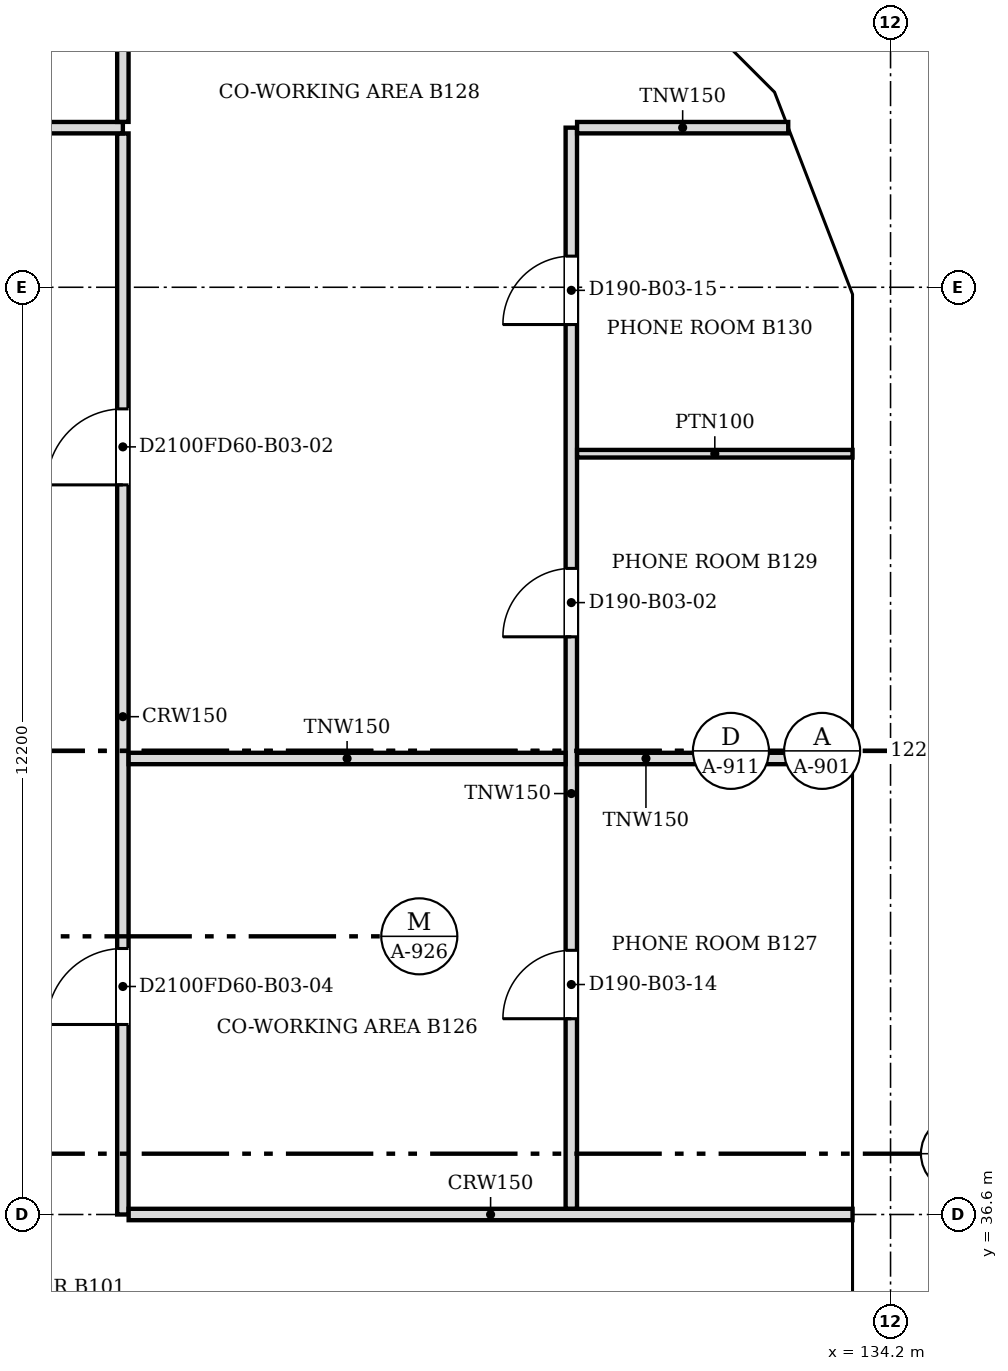
"""IFC4 building model, lengths in metres.
Left out: names, types, materials, properties, quantities, classifications, styles, units other than length and angle.
Written with IfcOpenShell. Run it as: python <this file> out.ifc"""

import sys

from ifc_helpers import new_model, si_unit, direction, frame, frame_2d, origin, place, context, subcontext, project, spatial, polyline, rectangle, outline, extrude, faceted_brep, source, transform, mapped, element, fill, save


model = new_model("IFC4")
c1 = context("Model", 3, precision=1e-05, world=origin(), true_north=direction((0.0, 1.0)))
c2 = subcontext(c1, "Body", "Model", "MODEL_VIEW")
j1 = project(units=[si_unit("LENGTHUNIT", "METRE"), si_unit("PLANEANGLEUNIT", "RADIAN")], contexts=[c1])
p1 = place(None, origin())
s1 = spatial("IfcSite", under=j1, at=p1, CompositionType="ELEMENT")
p2 = place(p1, origin())
s2 = spatial("IfcBuilding", under=s1, at=p2, CompositionType="ELEMENT")
p3 = place(p2, frame((0.0, 0.0, 25.8)))
s3 = spatial("IfcBuildingStorey", under=s2, at=p3, CompositionType="ELEMENT", Elevation=25.8)
m1 = source(origin(), c2, "Body", "SweptSolid", [
    extrude(outline(polyline([(6.1, 0.0), (3.05, 3.8), (0.0, 0.0), (6.1, 0.0)])), frame((0.0, 0.25, 0.0), z_axis=(0.0, -1.0, 0.0), x_axis=(1.0, 0.0, 0.0)), (0.0, 0.0, 1.0), 0.5),
])
p4 = place(p3, frame((133.95, 30.5, 0.0), z_axis=(0.0, 0.0, 1.0), x_axis=(0.0, 1.0, 0.0)))
e1 = element("IfcWall", 1, at=p4, inside=s3, PredefinedType="SOLIDWALL", context=c2, shape_type="MappedRepresentation", body=[
    mapped(m1, transform((0.0, 0.0, 0.0), scale=1.0)),
])
m2 = source(origin(), c2, "Body", "SweptSolid", [
    extrude(outline(polyline([(5.579, 0.25), (3.05, 3.401), (0.521, 0.25), (5.579, 0.25)])), frame((0.0, 0.26, 0.0), z_axis=(0.0, -1.0, 0.0), x_axis=(1.0, 0.0, 0.0)), (0.0, 0.0, 1.0), 0.52),
])
p5 = place(p4, origin())
e2 = element("IfcOpeningElement", 2, at=p5, cuts=e1, PredefinedType="OPENING", context=c2, shape_type="MappedRepresentation", body=[
    mapped(m2, transform((0.0, 0.0, 0.0), scale=1.0)),
])
m3 = source(origin(), c2, "Body", "Brep", [
    faceted_brep([(6.1, -0.25, 0.0), (3.05, -0.25, 3.8), (0.0, -0.25, 0.0), (6.1, -0.25, 0.0), (0.0, 0.25, 0.0), (3.05, 0.25, 3.8), (6.1, 0.25, 0.0), (6.1, 0.25, 0.0)], [[[0, 1, 2, 3]], [[4, 5, 6, 7]], [[6, 5, 1, 0]], [[5, 4, 2, 1]], [[4, 7, 3, 2]], [[3, 7, 6, 0]]]),
])
p6 = place(p3, frame((133.95, 36.6, 0.0), z_axis=(0.0, 0.0, 1.0), x_axis=(0.0, 1.0, 0.0)))
e3 = element("IfcWall", 3, at=p6, inside=s3, PredefinedType="SOLIDWALL", context=c2, shape_type="MappedRepresentation", body=[
    mapped(m3, transform((0.0, 0.0, 0.0), scale=1.0)),
])
p7 = place(p6, origin())
e4 = element("IfcOpeningElement", 4, at=p7, cuts=e3, PredefinedType="OPENING", context=c2, shape_type="MappedRepresentation", body=[
    mapped(m2, transform((0.0, 0.0, 0.0), scale=1.0)),
])
m4 = source(origin(), c2, "Body", "Brep", [
    faceted_brep([(6.053, -0.25, 0.0), (3.05, -0.25, 3.8), (0.0, -0.25, 0.0), (0.0, 0.25, 0.0), (3.05, 0.25, 3.8), (6.007, 0.25, 0.059), (6.007, 0.25, 0.0), (6.053, 0.0, 0.0)], [[[0, 1, 2]], [[3, 4, 5, 6]], [[5, 4, 1, 0, 7]], [[4, 3, 2, 1]], [[3, 6, 7, 0, 2]], [[7, 6, 5]]]),
])
p8 = place(p3, frame((133.95, 42.7, 0.0), z_axis=(0.0, 0.0, 1.0), x_axis=(0.0, 1.0, 0.0)))
e5 = element("IfcWall", 5, at=p8, inside=s3, PredefinedType="SOLIDWALL", context=c2, shape_type="MappedRepresentation", body=[
    mapped(m4, transform((0.0, 0.0, 0.0), scale=1.0)),
])
m5 = source(origin(), c2, "Body", "SweptSolid", [
    extrude(outline(polyline([(5.537, 0.25), (3.049, 3.399), (0.521, 0.25), (5.537, 0.25)])), frame((0.0, 0.26, 0.0), z_axis=(0.0, -1.0, 0.0), x_axis=(1.0, 0.0, 0.0)), (0.0, 0.0, 1.0), 0.52),
])
p9 = place(p8, origin())
e6 = element("IfcOpeningElement", 6, at=p9, cuts=e5, PredefinedType="OPENING", context=c2, shape_type="MappedRepresentation", body=[
    mapped(m5, transform((0.0, 0.0, 0.0), scale=1.0)),
])
m6 = source(origin(), c2, "Body", "Brep", [
    faceted_brep([(3.003, -0.25, 3.732), (2.95, -0.25, 3.8), (0.0, -0.25, 0.0), (3.003, -0.25, 0.0), (0.047, 0.25, 0.06), (2.898, 0.25, 3.732), (2.898, 0.25, 0.0), (0.047, 0.25, 0.0), (2.95, 0.0, 3.8), (0.0, 0.0, 0.0)], [[[0, 1, 2, 3]], [[4, 5, 6, 7]], [[8, 1, 0]], [[5, 4, 9, 2, 1, 8]], [[7, 6, 3, 2, 9]], [[7, 9, 4]], [[3, 6, 5, 8, 0]]]),
])
p10 = place(p3, frame((133.95, 48.753, 0.0), z_axis=(0.0, 0.0, 1.0), x_axis=(-0.359855894603, 0.933007896601, 0.0)))
e7 = element("IfcWall", 7, at=p10, inside=s3, PredefinedType="SOLIDWALL", context=c2, shape_type="MappedRepresentation", body=[
    mapped(m6, transform((0.0, 0.0, 0.0), scale=1.0)),
])
m7 = source(origin(), c2, "Body", "SweptSolid", [
    extrude(outline(polyline([(2.75, 3.135), (0.511, 0.25), (2.75, 0.25), (2.75, 3.135)])), frame((0.0, 0.26, 0.0), z_axis=(0.0, -1.0, 0.0), x_axis=(1.0, 0.0, 0.0)), (0.0, 0.0, 1.0), 0.52),
])
p11 = place(p10, origin())
e8 = element("IfcOpeningElement", 8, at=p11, cuts=e7, PredefinedType="OPENING", context=c2, shape_type="MappedRepresentation", body=[
    mapped(m7, transform((0.0, 0.0, 0.0), scale=1.0)),
])
m8 = source(origin(), c2, "Body", "Brep", [
    faceted_brep([(2.997, -0.25, 0.0), (0.053, -0.25, 3.8), (0.0, -0.25, 3.732), (0.0, -0.25, 0.0), (0.106, 0.25, 3.732), (2.944, 0.25, 0.068), (2.944, 0.25, 0.0), (0.106, 0.25, 0.0), (0.053, 0.0, 3.8), (2.997, 0.0, 0.0)], [[[0, 1, 2, 3]], [[4, 5, 6, 7]], [[5, 4, 8, 1, 0, 9]], [[2, 1, 8]], [[7, 6, 9, 0, 3]], [[7, 3, 2, 8, 4]], [[9, 6, 5]]]),
])
p12 = place(p3, frame((132.926, 51.469, 0.0), z_axis=(0.0, 0.0, 1.0), x_axis=(-0.707066050402, 0.707147509625, 0.0)))
e9 = element("IfcWall", 9, at=p12, inside=s3, PredefinedType="SOLIDWALL", context=c2, shape_type="MappedRepresentation", body=[
    mapped(m8, transform((0.0, 0.0, 0.0), scale=1.0)),
])
m9 = source(origin(), c2, "Body", "SweptSolid", [
    extrude(outline(polyline([(2.487, 0.25), (0.253, 3.134), (0.253, 0.25), (2.487, 0.25)])), frame((0.0, 0.26, 0.0), z_axis=(0.0, -1.0, 0.0), x_axis=(1.0, 0.0, 0.0)), (0.0, 0.0, 1.0), 0.52),
])
p13 = place(p12, origin())
e10 = element("IfcOpeningElement", 10, at=p13, cuts=e9, PredefinedType="OPENING", context=c2, shape_type="MappedRepresentation", body=[
    mapped(m9, transform((0.0, 0.0, 0.0), scale=1.0)),
])
p14 = place(p2, frame((0.0, 0.0, 29.6)))
s4 = spatial("IfcBuildingStorey", under=s2, at=p14, CompositionType="ELEMENT", Elevation=29.6)
m10 = source(origin(), c2, "Body", "Brep", [
    faceted_brep([(3.05, -0.25, 0.0), (6.1, -0.25, 3.8), (6.1, -0.25, 3.8), (3.05, -0.25, 7.6), (0.0, -0.25, 3.8), (0.0, 0.25, 3.8), (3.05, 0.25, 7.6), (6.1, 0.25, 3.8), (6.1, 0.25, 3.8), (3.05, 0.25, 0.0)], [[[0, 1, 2, 3, 4]], [[5, 6, 7, 8, 9]], [[9, 8, 1, 0]], [[7, 6, 3, 2]], [[6, 5, 4, 3]], [[5, 9, 0, 4]], [[1, 8, 7, 2]]]),
])
p15 = place(p14, frame((133.95, 33.55, -3.8), z_axis=(0.0, 0.0, 1.0), x_axis=(0.0, 1.0, 0.0)))
e11 = element("IfcWall", 11, at=p15, inside=s4, PredefinedType="SOLIDWALL", context=c2, shape_type="MappedRepresentation", body=[
    mapped(m10, transform((0.0, 0.0, 0.0), scale=1.0)),
])
m11 = source(origin(), c2, "Body", "SweptSolid", [
    extrude(outline(polyline([(3.05, 0.399), (5.78, 3.8), (3.05, 7.2), (0.321, 3.8), (3.05, 0.399)])), frame((0.0, 0.26, 0.0), z_axis=(0.0, -1.0, 0.0), x_axis=(1.0, 0.0, 0.0)), (0.0, 0.0, 1.0), 0.52),
])
p16 = place(p15, origin())
e12 = element("IfcOpeningElement", 12, at=p16, cuts=e11, PredefinedType="OPENING", context=c2, shape_type="MappedRepresentation", body=[
    mapped(m11, transform((0.0, 0.0, 0.0), scale=1.0)),
])
m12 = source(origin(), c2, "Body", "SweptSolid", [
    extrude(outline(polyline([(3.05, 0.0), (6.1, 3.8), (3.05, 7.6), (0.0, 3.8), (3.05, 0.0)])), frame((0.0, 0.25, 0.0), z_axis=(0.0, -1.0, 0.0), x_axis=(1.0, 0.0, 0.0)), (0.0, 0.0, 1.0), 0.5),
])
p17 = place(p14, frame((133.95, 39.65, -3.8), z_axis=(0.0, 0.0, 1.0), x_axis=(0.0, 1.0, 0.0)))
e13 = element("IfcWall", 13, at=p17, inside=s4, PredefinedType="SOLIDWALL", context=c2, shape_type="MappedRepresentation", body=[
    mapped(m12, transform((0.0, 0.0, 0.0), scale=1.0)),
])
p18 = place(p17, origin())
e14 = element("IfcOpeningElement", 14, at=p18, cuts=e13, PredefinedType="OPENING", context=c2, shape_type="MappedRepresentation", body=[
    mapped(m11, transform((0.0, 0.0, 0.0), scale=1.0)),
])
m13 = source(origin(), c2, "Body", "Brep", [
    faceted_brep([(3.003, -0.25, 0.0), (3.05, -0.25, 0.06), (3.05, -0.25, 7.54), (3.003, -0.25, 7.6), (0.0, -0.25, 3.8), (0.0, 0.25, 3.8), (2.957, 0.25, 7.541), (2.957, 0.25, 0.059), (3.003, 0.0, 0.0), (3.003, 0.0, 7.6)], [[[0, 1, 2, 3, 4]], [[5, 6, 7]], [[1, 0, 8]], [[9, 3, 2]], [[6, 5, 4, 3, 9]], [[5, 7, 8, 0, 4]], [[1, 8, 7, 6, 9, 2]]]),
])
p19 = place(p14, frame((133.95, 45.75, -3.8), z_axis=(0.0, 0.0, 1.0), x_axis=(0.0, 1.0, 0.0)))
e15 = element("IfcWall", 15, at=p19, inside=s4, PredefinedType="SOLIDWALL", context=c2, shape_type="MappedRepresentation", body=[
    mapped(m13, transform((0.0, 0.0, 0.0), scale=1.0)),
])
m14 = source(origin(), c2, "Body", "SweptSolid", [
    extrude(outline(polyline([(2.803, 6.944), (0.319, 3.8), (2.803, 0.656), (2.803, 6.944)])), frame((0.0, 0.26, 0.0), z_axis=(0.0, -1.0, 0.0), x_axis=(1.0, 0.0, 0.0)), (0.0, 0.0, 1.0), 0.52),
])
p20 = place(p19, origin())
e16 = element("IfcOpeningElement", 16, at=p20, cuts=e15, PredefinedType="OPENING", context=c2, shape_type="MappedRepresentation", body=[
    mapped(m14, transform((0.0, 0.0, 0.0), scale=1.0)),
])
m15 = source(origin(), c2, "Body", "Brep", [
    faceted_brep([(0.047, -0.25, 0.0), (2.997, -0.25, 3.8), (0.047, -0.25, 7.6), (0.0, -0.25, 7.541), (0.0, -0.25, 0.059), (0.093, 0.25, 7.54), (2.944, 0.25, 3.868), (2.944, 0.25, 3.732), (0.093, 0.25, 0.06), (2.997, 0.0, 3.8), (0.047, 0.0, 0.0), (0.047, 0.0, 7.6)], [[[0, 1, 2, 3, 4]], [[5, 6, 7, 8]], [[8, 7, 9, 1, 0, 10]], [[6, 5, 11, 2, 1, 9]], [[3, 2, 11]], [[10, 0, 4]], [[8, 10, 4, 3, 11, 5]], [[7, 6, 9]]]),
])
p21 = place(p14, frame((133.967, 48.71, -3.8), z_axis=(0.0, 0.0, 1.0), x_axis=(-0.359901446078, 0.932990326376, 0.0)))
e17 = element("IfcWall", 17, at=p21, inside=s4, PredefinedType="SOLIDWALL", context=c2, shape_type="MappedRepresentation", body=[
    mapped(m15, transform((0.0, 0.0, 0.0), scale=1.0)),
])
m16 = source(origin(), c2, "Body", "SweptSolid", [
    extrude(outline(polyline([(0.247, 0.665), (2.681, 3.8), (0.247, 6.935), (0.247, 0.665)])), frame((0.0, 0.26, 0.0), z_axis=(0.0, -1.0, 0.0), x_axis=(1.0, 0.0, 0.0)), (0.0, 0.0, 1.0), 0.52),
])
p22 = place(p21, origin())
e18 = element("IfcOpeningElement", 18, at=p22, cuts=e17, PredefinedType="OPENING", context=c2, shape_type="MappedRepresentation", body=[
    mapped(m16, transform((0.0, 0.0, 0.0), scale=1.0)),
])
m17 = source(origin(), c2, "Body", "Brep", [
    faceted_brep([(2.944, -0.25, 0.0), (2.997, -0.25, 0.068), (2.997, -0.25, 7.532), (2.944, -0.25, 7.6), (0.0, -0.25, 3.8), (0.053, 0.25, 3.868), (2.891, 0.25, 7.532), (2.891, 0.25, 0.068), (0.053, 0.25, 3.732), (2.944, 0.0, 0.0), (2.944, 0.0, 7.6), (0.0, 0.0, 3.8)], [[[0, 1, 2, 3, 4]], [[5, 6, 7, 8]], [[1, 0, 9]], [[10, 3, 2]], [[6, 5, 11, 4, 3, 10]], [[8, 7, 9, 0, 4, 11]], [[8, 11, 5]], [[1, 9, 7, 6, 10, 2]]]),
])
p23 = place(p14, frame((132.888, 51.506, -3.8), z_axis=(0.0, 0.0, 1.0), x_axis=(-0.707147509625, 0.707066050402, 0.0)))
e19 = element("IfcWall", 19, at=p23, inside=s4, PredefinedType="SOLIDWALL", context=c2, shape_type="MappedRepresentation", body=[
    mapped(m17, transform((0.0, 0.0, 0.0), scale=1.0)),
])
m18 = source(origin(), c2, "Body", "SweptSolid", [
    extrude(outline(polyline([(2.744, 6.934), (0.316, 3.8), (2.744, 0.666), (2.744, 6.934)])), frame((0.0, 0.26, 0.0), z_axis=(0.0, -1.0, 0.0), x_axis=(1.0, 0.0, 0.0)), (0.0, 0.0, 1.0), 0.52),
])
p24 = place(p23, origin())
e20 = element("IfcOpeningElement", 20, at=p24, cuts=e19, PredefinedType="OPENING", context=c2, shape_type="MappedRepresentation", body=[
    mapped(m18, transform((0.0, 0.0, 0.0), scale=1.0)),
])
p25 = place(p3, frame((124.1, 50.824, 0.0), z_axis=(0.0, 0.0, 1.0), x_axis=(0.0, -1.0, 0.0)))
e21 = element("IfcWall", 21, at=p25, inside=s3, PredefinedType="PARTITIONING", context=c2, shape_type="SweptSolid", body=[
    extrude(rectangle(XDim=14.224, YDim=0.15, at=frame_2d((7.112, 0.0))), origin(), (0.0, 0.0, 1.0), 3.067),
])
m19 = source(origin(), c2, "Body", "SweptSolid", [
    extrude(rectangle(XDim=1.0, YDim=2.1, at=frame_2d((0.5, 1.05))), frame((0.0, 0.085, 0.0), z_axis=(0.0, -1.0, 0.0), x_axis=(1.0, 0.0, 0.0)), (0.0, 0.0, 1.0), 0.17),
])
p26 = place(p25, frame((3.624, 0.0, 0.0)))
e22 = element("IfcOpeningElement", 22, at=p26, cuts=e21, PredefinedType="OPENING", context=c2, shape_type="MappedRepresentation", body=[
    mapped(m19, transform((0.0, 0.0, 0.0), scale=1.0)),
])
p27 = place(p25, frame((10.724, 0.0, 0.0)))
e23 = element("IfcOpeningElement", 23, at=p27, cuts=e21, PredefinedType="OPENING", context=c2, shape_type="MappedRepresentation", body=[
    mapped(m19, transform((0.0, 0.0, 0.0), scale=1.0)),
])
p28 = place(p3, frame((124.176, 36.6, 0.0), z_axis=(0.0, 0.0, 1.0), x_axis=(1.0, 0.0, 0.0)))
e24 = element("IfcWall", 24, at=p28, inside=s3, PredefinedType="PARTITIONING", context=c2, shape_type="SweptSolid", body=[
    extrude(rectangle(XDim=9.524, YDim=0.15, at=frame_2d((4.762, 0.0))), origin(), (0.0, 0.0, 1.0), 3.067),
])
p29 = place(p3, frame((130.0, 50.9, 0.0), z_axis=(0.0, 0.0, 1.0), x_axis=(0.0, -1.0, 0.0)))
e25 = element("IfcWall", 25, at=p29, inside=s3, PredefinedType="PARTITIONING", context=c2, shape_type="SweptSolid", body=[
    extrude(rectangle(XDim=14.224, YDim=0.15, at=frame_2d((7.112, 0.0))), origin(), (0.0, 0.0, 1.0), 3.067),
])
m20 = source(origin(), c2, "Body", "SweptSolid", [
    extrude(rectangle(XDim=0.9, YDim=2.1, at=frame_2d((0.45, 1.05))), frame((0.0, 0.085, 0.0), z_axis=(0.0, -1.0, 0.0), x_axis=(1.0, 0.0, 0.0)), (0.0, 0.0, 1.0), 0.17),
])
p30 = place(p29, frame((5.799, 0.0, 0.0)))
e26 = element("IfcOpeningElement", 26, at=p30, cuts=e25, PredefinedType="OPENING", context=c2, shape_type="MappedRepresentation", body=[
    mapped(m20, transform((0.0, 0.0, 0.0), scale=1.0)),
])
p31 = place(p29, frame((10.824, 0.0, 0.0)))
e27 = element("IfcOpeningElement", 27, at=p31, cuts=e25, PredefinedType="OPENING", context=c2, shape_type="MappedRepresentation", body=[
    mapped(m20, transform((0.0, 0.0, 0.0), scale=1.0)),
])
p32 = place(p29, frame((1.69, 0.0, 0.0)))
e28 = element("IfcOpeningElement", 28, at=p32, cuts=e25, PredefinedType="OPENING", context=c2, shape_type="MappedRepresentation", body=[
    mapped(m20, transform((0.0, 0.0, 0.0), scale=1.0)),
])
p33 = place(p3, frame((124.176, 42.6, 0.0), z_axis=(0.0, 0.0, 1.0), x_axis=(1.0, 0.0, 0.0)))
e29 = element("IfcWall", 29, at=p33, inside=s3, PredefinedType="PARTITIONING", context=c2, shape_type="SweptSolid", body=[
    extrude(rectangle(XDim=5.748, YDim=0.15, at=frame_2d((2.874, 0.0))), origin(), (0.0, 0.0, 1.0), 3.067),
])
p34 = place(p3, frame((130.076, 42.6, 0.0), z_axis=(0.0, 0.0, 1.0), x_axis=(1.0, 0.0, 0.0)))
e30 = element("IfcWall", 30, at=p34, inside=s3, PredefinedType="PARTITIONING", context=c2, shape_type="SweptSolid", body=[
    extrude(rectangle(XDim=3.624, YDim=0.15, at=frame_2d((1.812, 0.0))), origin(), (0.0, 0.0, 1.0), 3.067),
])
p35 = place(p3, frame((130.076, 46.61, 0.0), z_axis=(0.0, 0.0, 1.0), x_axis=(1.0, 0.0, 0.0)))
e31 = element("IfcWall", 31, at=p35, inside=s3, PredefinedType="PARTITIONING", context=c2, shape_type="SweptSolid", body=[
    extrude(rectangle(XDim=3.624, YDim=0.1, at=frame_2d((1.812, 0.0))), origin(), (0.0, 0.0, 1.0), 3.067),
])
p36 = place(p3, frame((108.5, 50.9, 0.0), z_axis=(0.0, 0.0, 1.0), x_axis=(1.0, 0.0, 0.0)))
e32 = element("IfcWall", 32, at=p36, inside=s3, PredefinedType="PARTITIONING", context=c2, shape_type="SweptSolid", body=[
    extrude(rectangle(XDim=15.6, YDim=0.15, at=frame_2d((7.8, 0.0))), origin(), (0.0, 0.0, 1.0), 3.067),
])
p37 = place(p36, frame((7.3, 0.0, 0.0)))
e33 = element("IfcOpeningElement", 33, at=p37, cuts=e32, PredefinedType="OPENING", context=c2, shape_type="MappedRepresentation", body=[
    mapped(m19, transform((0.0, 0.0, 0.0), scale=1.0)),
])
p38 = place(p3, frame((130.076, 50.9, 0.0), z_axis=(0.0, 0.0, 1.0), x_axis=(1.0, 0.0, 0.0)))
e34 = element("IfcWall", 34, at=p38, inside=s3, PredefinedType="PARTITIONING", context=c2, shape_type="SweptSolid", body=[
    extrude(rectangle(XDim=2.778, YDim=0.15, at=frame_2d((1.389, 0.0))), origin(), (0.0, 0.0, 1.0), 3.067),
])
p39 = place(p3, frame((124.1, 50.976, 0.0), z_axis=(0.0, 0.0, 1.0), x_axis=(0.0, 1.0, 0.0)))
e35 = element("IfcWall", 35, at=p39, inside=s3, PredefinedType="PARTITIONING", context=c2, shape_type="SweptSolid", body=[
    extrude(rectangle(XDim=3.424, YDim=0.15, at=frame_2d((1.712, 0.0))), origin(), (0.0, 0.0, 1.0), 3.067),
])
m21 = source(origin(), c2, "Body", "SweptSolid", [
    extrude(rectangle(XDim=0.9, YDim=2.1, at=frame_2d((0.45, 1.05))), frame((0.0, 0.025, 0.0), z_axis=(0.0, -1.0, 0.0), x_axis=(1.0, 0.0, 0.0)), (0.0, 0.0, 1.0), 0.05),
])
p40 = place(p30, origin())
e36 = element("IfcDoor", 36, at=p40, inside=s3, OperationType="SINGLE_SWING_RIGHT", PredefinedType="DOOR", context=c2, shape_type="MappedRepresentation", body=[
    mapped(m21, transform((0.0, 0.0, 0.0), scale=1.0)),
])
fill(e26, e36)
p41 = place(p31, origin())
e37 = element("IfcDoor", 37, at=p41, inside=s3, OperationType="SINGLE_SWING_RIGHT", PredefinedType="DOOR", context=c2, shape_type="MappedRepresentation", body=[
    mapped(m21, transform((0.0, 0.0, 0.0), scale=1.0)),
])
fill(e27, e37)
p42 = place(p32, origin())
e38 = element("IfcDoor", 38, at=p42, inside=s3, OperationType="SINGLE_SWING_RIGHT", PredefinedType="DOOR", context=c2, shape_type="MappedRepresentation", body=[
    mapped(m21, transform((0.0, 0.0, 0.0), scale=1.0)),
])
fill(e28, e38)
m22 = source(origin(), c2, "Body", "SweptSolid", [
    extrude(rectangle(XDim=1.0, YDim=2.1, at=frame_2d((0.5, 1.05))), frame((0.0, 0.025, 0.0), z_axis=(0.0, -1.0, 0.0), x_axis=(1.0, 0.0, 0.0)), (0.0, 0.0, 1.0), 0.05),
])
p43 = place(p26, origin())
e39 = element("IfcDoor", 39, at=p43, inside=s3, OperationType="SINGLE_SWING_RIGHT", PredefinedType="DOOR", context=c2, shape_type="MappedRepresentation", body=[
    mapped(m22, transform((0.0, 0.0, 0.0), scale=1.0)),
])
fill(e22, e39)
p44 = place(p27, origin())
e40 = element("IfcDoor", 40, at=p44, inside=s3, OperationType="SINGLE_SWING_RIGHT", PredefinedType="DOOR", context=c2, shape_type="MappedRepresentation", body=[
    mapped(m22, transform((0.0, 0.0, 0.0), scale=1.0)),
])
fill(e23, e40)
save(model, sys.argv[1])
